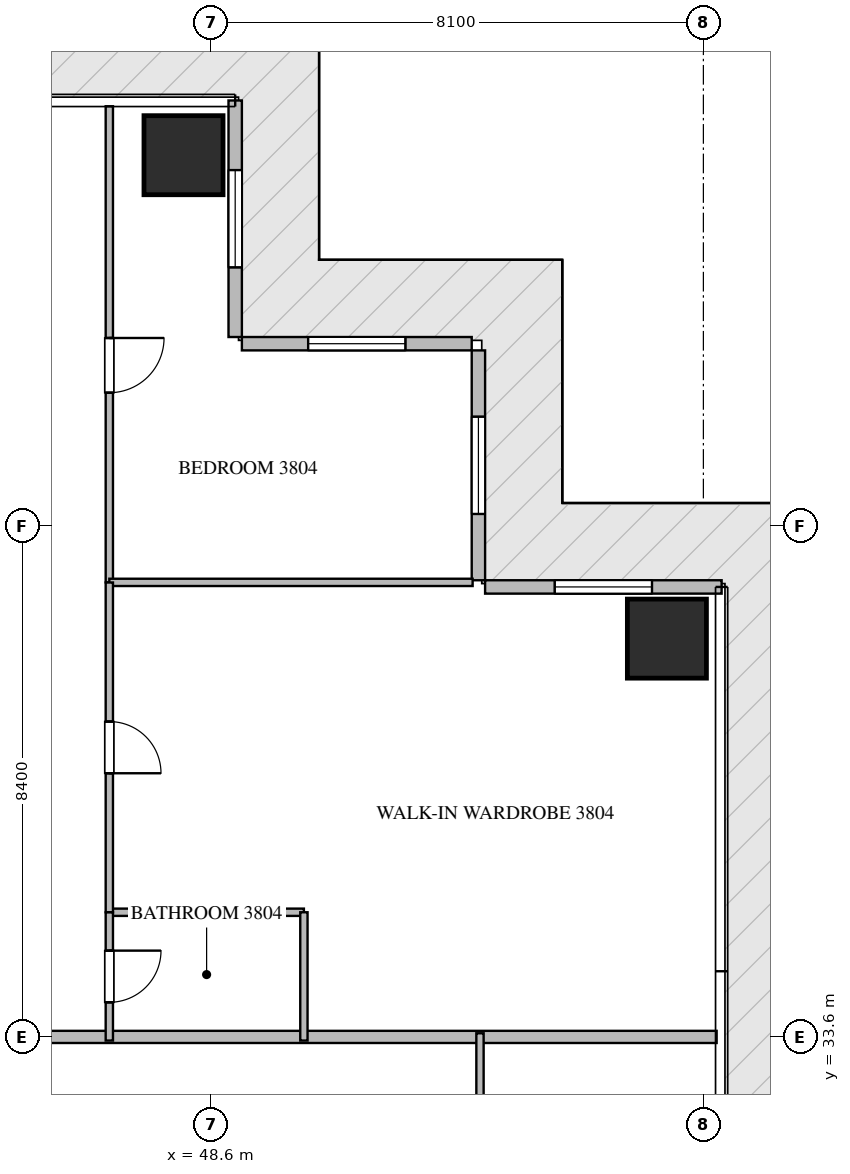
"""IFC4 building model, lengths in metres.
Left out: names, types, materials, properties, quantities, classifications, styles, units other than length and angle.
Written with IfcOpenShell. Run it as: python <this file> out.ifc"""

import sys

from ifc_helpers import new_model, si_unit, direction, frame, frame_2d, origin, origin_2d, place, context, subcontext, project, spatial, rectangle, extrude, source, transform, mapped, element, fill, save


model = new_model("IFC4")
c1 = context("Model", 3, precision=1e-05, world=origin(), true_north=direction((0.0, 1.0)))
c2 = subcontext(c1, "Body", "Model", "MODEL_VIEW")
j1 = project(units=[si_unit("LENGTHUNIT", "METRE"), si_unit("PLANEANGLEUNIT", "RADIAN")], contexts=[c1])
p1 = place(None, origin())
s1 = spatial("IfcSite", under=j1, at=p1, CompositionType="ELEMENT")
p2 = place(p1, origin())
s2 = spatial("IfcBuilding", under=s1, at=p2, CompositionType="ELEMENT")
p3 = place(p2, frame((0.0, 0.0, 153.9)))
s3 = spatial("IfcBuildingStorey", under=s2, at=p3, CompositionType="ELEMENT", Elevation=153.9)
m1 = source(origin(), c2, "Body", "SweptSolid", [
    extrude(rectangle(XDim=1.3, YDim=1.3, at=origin_2d()), origin(), (0.0, 0.0, 1.0), 3.75),
])
for number, where, z_axis, x_axis in (
    (1, (48.15, 48.1, -0.26), (0.0, 0.0, 1.0), (1.0, 0.0, 0.0)),
    (2, (56.1, 40.15, -0.26), (0.0, 0.0, 1.0), (1.0, 0.0, 0.0)),
):
    element("IfcColumn", number, at=place(p3, frame(where, z_axis=z_axis, x_axis=x_axis)), inside=s3, PredefinedType="COLUMN", context=c2, shape_type="MappedRepresentation", body=[
        mapped(m1, transform((0.0, 0.0, 0.0), scale=1.0)),
    ])
p4 = place(p3, frame((57.0, 41.0, 0.0), z_axis=(0.0, 0.0, 1.0), x_axis=(-1.0, 0.0, 0.0)))
e3 = element("IfcWall", 3, at=p4, inside=s3, PredefinedType="ELEMENTEDWALL", context=c2, shape_type="SweptSolid", body=[
    extrude(rectangle(XDim=3.89, YDim=0.22, at=frame_2d((1.945, 0.0))), origin(), (0.0, 0.0, 1.0), 3.475),
])
p5 = place(p4, frame((1.145, 0.0, 0.65)))
e4 = element("IfcOpeningElement", 4, at=p5, cuts=e3, PredefinedType="OPENING", context=c2, shape_type="SweptSolid", body=[
    extrude(rectangle(XDim=1.6, YDim=2.1, at=frame_2d((0.8, 1.05))), frame((0.0, 0.12, 0.0), z_axis=(0.0, -1.0, 0.0), x_axis=(1.0, 0.0, 0.0)), (0.0, 0.0, 1.0), 0.24),
])
p6 = place(p3, frame((53.0, 41.11, 0.0), z_axis=(0.0, 0.0, 1.0), x_axis=(0.0, 1.0, 0.0)))
e5 = element("IfcWall", 5, at=p6, inside=s3, PredefinedType="ELEMENTEDWALL", context=c2, shape_type="SweptSolid", body=[
    extrude(rectangle(XDim=3.78, YDim=0.22, at=frame_2d((1.89, 0.0))), origin(), (0.0, 0.0, 1.0), 3.475),
])
p7 = place(p6, frame((1.09, 0.0, 0.65)))
e6 = element("IfcOpeningElement", 6, at=p7, cuts=e5, PredefinedType="OPENING", context=c2, shape_type="SweptSolid", body=[
    extrude(rectangle(XDim=1.6, YDim=2.1, at=frame_2d((0.8, 1.05))), frame((0.0, 0.12, 0.0), z_axis=(0.0, -1.0, 0.0), x_axis=(1.0, 0.0, 0.0)), (0.0, 0.0, 1.0), 0.24),
])
p8 = place(p3, frame((52.89, 45.0, 0.0), z_axis=(0.0, 0.0, 1.0), x_axis=(-1.0, 0.0, 0.0)))
e7 = element("IfcWall", 7, at=p8, inside=s3, PredefinedType="ELEMENTEDWALL", context=c2, shape_type="SweptSolid", body=[
    extrude(rectangle(XDim=3.78, YDim=0.22, at=frame_2d((1.89, 0.0))), origin(), (0.0, 0.0, 1.0), 3.475),
])
p9 = place(p8, frame((1.09, 0.0, 0.65)))
e8 = element("IfcOpeningElement", 8, at=p9, cuts=e7, PredefinedType="OPENING", context=c2, shape_type="SweptSolid", body=[
    extrude(rectangle(XDim=1.6, YDim=2.1, at=frame_2d((0.8, 1.05))), frame((0.0, 0.12, 0.0), z_axis=(0.0, -1.0, 0.0), x_axis=(1.0, 0.0, 0.0)), (0.0, 0.0, 1.0), 0.24),
])
p10 = place(p3, frame((49.0, 45.11, 0.0), z_axis=(0.0, 0.0, 1.0), x_axis=(0.0, 1.0, 0.0)))
e9 = element("IfcWall", 9, at=p10, inside=s3, PredefinedType="ELEMENTEDWALL", context=c2, shape_type="SweptSolid", body=[
    extrude(rectangle(XDim=3.89, YDim=0.22, at=frame_2d((1.945, 0.0))), origin(), (0.0, 0.0, 1.0), 3.475),
])
p11 = place(p10, frame((1.145, 0.0, 0.65)))
e10 = element("IfcOpeningElement", 10, at=p11, cuts=e9, PredefinedType="OPENING", context=c2, shape_type="SweptSolid", body=[
    extrude(rectangle(XDim=1.6, YDim=2.1, at=frame_2d((0.8, 1.05))), frame((0.0, 0.12, 0.0), z_axis=(0.0, -1.0, 0.0), x_axis=(1.0, 0.0, 0.0)), (0.0, 0.0, 1.0), 0.24),
])
p12 = place(p3, frame((43.85, 33.6, 0.0), z_axis=(0.0, 0.0, 1.0), x_axis=(1.0, 0.0, 0.0)))
e11 = element("IfcWall", 11, at=p12, inside=s3, PredefinedType="PARTITIONING", context=c2, shape_type="SweptSolid", body=[
    extrude(rectangle(XDim=13.068, YDim=0.2, at=frame_2d((6.534, 0.0))), origin(), (0.0, 0.0, 1.0), 3.49),
])
p13 = place(p3, frame((46.93, 48.905, 0.0), z_axis=(0.0, 0.0, 1.0), x_axis=(0.0, -1.0, 0.0)))
e12 = element("IfcWall", 12, at=p13, inside=s3, PredefinedType="PARTITIONING", context=c2, shape_type="SweptSolid", body=[
    extrude(rectangle(XDim=7.83, YDim=0.12, at=frame_2d((3.915, 0.0))), origin(), (0.0, 0.0, 1.0), 3.49),
])
p14 = place(p13, frame((3.811, 0.0, 0.0)))
e13 = element("IfcOpeningElement", 13, at=p14, cuts=e12, PredefinedType="OPENING", context=c2, shape_type="SweptSolid", body=[
    extrude(rectangle(XDim=0.9, YDim=2.1, at=frame_2d((0.45, 1.05))), frame((0.0, 0.07, 0.0), z_axis=(0.0, -1.0, 0.0), x_axis=(1.0, 0.0, 0.0)), (0.0, 0.0, 1.0), 0.14),
])
p15 = place(p3, frame((46.93, 41.075, 0.0), z_axis=(0.0, 0.0, 1.0), x_axis=(1.0, 0.0, 0.0)))
e14 = element("IfcWall", 14, at=p15, inside=s3, PredefinedType="PARTITIONING", context=c2, shape_type="SweptSolid", body=[
    extrude(rectangle(XDim=5.975, YDim=0.12, at=frame_2d((2.988, 0.0))), origin(), (0.0, 0.0, 1.0), 3.49),
])
p16 = place(p3, frame((46.93, 35.65, 0.0), z_axis=(0.0, 0.0, 1.0), x_axis=(1.0, 0.0, 0.0)))
e15 = element("IfcWall", 15, at=p16, inside=s3, PredefinedType="PARTITIONING", context=c2, shape_type="SweptSolid", body=[
    extrude(rectangle(XDim=3.2, YDim=0.12, at=frame_2d((1.6, 0.0))), origin(), (0.0, 0.0, 1.0), 3.49),
])
p17 = place(p3, frame((50.13, 35.65, 0.0), z_axis=(0.0, 0.0, 1.0), x_axis=(0.0, -1.0, 0.0)))
e16 = element("IfcWall", 16, at=p17, inside=s3, PredefinedType="PARTITIONING", context=c2, shape_type="SweptSolid", body=[
    extrude(rectangle(XDim=2.11, YDim=0.12, at=frame_2d((1.055, 0.0))), origin(), (0.0, 0.0, 1.0), 3.49),
])
p18 = place(p3, frame((46.93, 41.073, 0.0), z_axis=(0.0, 0.0, 1.0), x_axis=(0.0, -1.0, 0.0)))
e17 = element("IfcWall", 17, at=p18, inside=s3, PredefinedType="PARTITIONING", context=c2, shape_type="SweptSolid", body=[
    extrude(rectangle(XDim=5.423, YDim=0.12, at=frame_2d((2.711, 0.0))), origin(), (0.0, 0.0, 1.0), 3.49),
])
p19 = place(p18, frame((2.287, 0.0, 0.0)))
e18 = element("IfcOpeningElement", 18, at=p19, cuts=e17, PredefinedType="OPENING", context=c2, shape_type="SweptSolid", body=[
    extrude(rectangle(XDim=0.85, YDim=2.1, at=frame_2d((0.425, 1.05))), frame((0.0, 0.07, 0.0), z_axis=(0.0, -1.0, 0.0), x_axis=(1.0, 0.0, 0.0)), (0.0, 0.0, 1.0), 0.14),
])
p20 = place(p3, frame((46.93, 35.648, 0.0), z_axis=(0.0, 0.0, 1.0), x_axis=(0.0, -1.0, 0.0)))
e19 = element("IfcWall", 19, at=p20, inside=s3, PredefinedType="PARTITIONING", context=c2, shape_type="SweptSolid", body=[
    extrude(rectangle(XDim=2.108, YDim=0.12, at=frame_2d((1.054, 0.0))), origin(), (0.0, 0.0, 1.0), 3.49),
])
p21 = place(p20, frame((0.629, 0.0, 0.0)))
e20 = element("IfcOpeningElement", 20, at=p21, cuts=e19, PredefinedType="OPENING", context=c2, shape_type="SweptSolid", body=[
    extrude(rectangle(XDim=0.85, YDim=2.1, at=frame_2d((0.425, 1.05))), frame((0.0, 0.07, 0.0), z_axis=(0.0, -1.0, 0.0), x_axis=(1.0, 0.0, 0.0)), (0.0, 0.0, 1.0), 0.14),
])
p22 = place(p3, frame((53.026, 22.6, 0.0), z_axis=(0.0, 0.0, 1.0), x_axis=(0.0, 1.0, 0.0)))
e21 = element("IfcWall", 21, at=p22, inside=s3, PredefinedType="PARTITIONING", context=c2, shape_type="SweptSolid", body=[
    extrude(rectangle(XDim=11.06, YDim=0.12, at=frame_2d((5.53, 0.0))), origin(), (0.0, 0.0, 1.0), 3.49),
])
m2 = source(origin(), c2, "Body", "SweptSolid", [
    extrude(rectangle(XDim=1.6, YDim=2.1, at=frame_2d((0.8, 1.05))), frame((0.0, 0.03, 0.0), z_axis=(0.0, -1.0, 0.0), x_axis=(1.0, 0.0, 0.0)), (0.0, 0.0, 1.0), 0.06),
])
p23 = place(p5, origin())
e22 = element("IfcWindow", 22, at=p23, inside=s3, PartitioningType="SINGLE_PANEL", PredefinedType="WINDOW", context=c2, shape_type="MappedRepresentation", body=[
    mapped(m2, transform((0.0, 0.0, 0.0), scale=1.0)),
])
fill(e4, e22)
p24 = place(p7, origin())
e23 = element("IfcWindow", 23, at=p24, inside=s3, PartitioningType="SINGLE_PANEL", PredefinedType="WINDOW", context=c2, shape_type="MappedRepresentation", body=[
    mapped(m2, transform((0.0, 0.0, 0.0), scale=1.0)),
])
fill(e6, e23)
p25 = place(p9, origin())
e24 = element("IfcWindow", 24, at=p25, inside=s3, PartitioningType="SINGLE_PANEL", PredefinedType="WINDOW", context=c2, shape_type="MappedRepresentation", body=[
    mapped(m2, transform((0.0, 0.0, 0.0), scale=1.0)),
])
fill(e8, e24)
p26 = place(p11, origin())
e25 = element("IfcWindow", 25, at=p26, inside=s3, PartitioningType="SINGLE_PANEL", PredefinedType="WINDOW", context=c2, shape_type="MappedRepresentation", body=[
    mapped(m2, transform((0.0, 0.0, 0.0), scale=1.0)),
])
fill(e10, e25)
m3 = source(origin(), c2, "Body", "SweptSolid", [
    extrude(rectangle(XDim=0.9, YDim=2.1, at=frame_2d((0.45, 1.05))), frame((0.0, 0.025, 0.0), z_axis=(0.0, -1.0, 0.0), x_axis=(1.0, 0.0, 0.0)), (0.0, 0.0, 1.0), 0.05),
])
p27 = place(p14, origin())
e26 = element("IfcDoor", 26, at=p27, inside=s3, OperationType="SINGLE_SWING_LEFT", PredefinedType="DOOR", context=c2, shape_type="MappedRepresentation", body=[
    mapped(m3, transform((0.0, 0.0, 0.0), scale=1.0)),
])
fill(e13, e26)
m4 = source(origin(), c2, "Body", "SweptSolid", [
    extrude(rectangle(XDim=0.85, YDim=2.1, at=frame_2d((0.425, 1.05))), frame((0.0, 0.025, 0.0), z_axis=(0.0, -1.0, 0.0), x_axis=(1.0, 0.0, 0.0)), (0.0, 0.0, 1.0), 0.05),
])
p28 = place(p19, origin())
e27 = element("IfcDoor", 27, at=p28, inside=s3, OperationType="SINGLE_SWING_RIGHT", PredefinedType="DOOR", context=c2, shape_type="MappedRepresentation", body=[
    mapped(m4, transform((0.0, 0.0, 0.0), scale=1.0)),
])
fill(e18, e27)
p29 = place(p21, origin())
e28 = element("IfcDoor", 28, at=p29, inside=s3, OperationType="SINGLE_SWING_LEFT", PredefinedType="DOOR", context=c2, shape_type="MappedRepresentation", body=[
    mapped(m4, transform((0.0, 0.0, 0.0), scale=1.0)),
])
fill(e20, e28)
save(model, sys.argv[1])
